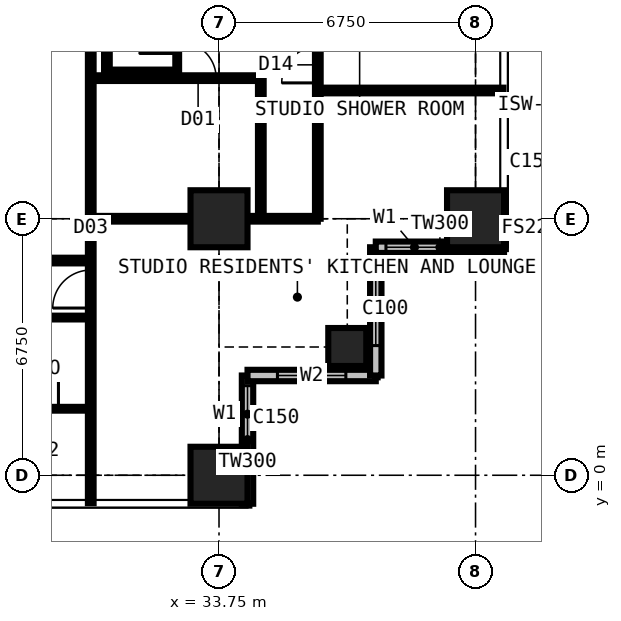
"""IFC4 building model, lengths in metres.
Left out: names, types, materials, properties, quantities, classifications, styles, units other than length and angle.
Written with IfcOpenShell. Run it as: python <this file> out.ifc"""

import sys

from ifc_helpers import new_model, si_unit, direction, frame, frame_2d, origin, origin_2d, place, context, subcontext, project, spatial, rectangle, extrude, element, fill, save


model = new_model("IFC4")
c1 = context("Model", 3, precision=1e-05, world=origin(), true_north=direction((0.0, 1.0)))
c2 = subcontext(c1, "Body", "Model", "MODEL_VIEW")
j1 = project(units=[si_unit("LENGTHUNIT", "METRE"), si_unit("PLANEANGLEUNIT", "RADIAN")], contexts=[c1])
p1 = place(None, origin())
s1 = spatial("IfcSite", under=j1, at=p1, CompositionType="ELEMENT")
p2 = place(p1, origin())
s2 = spatial("IfcBuilding", under=s1, at=p2, CompositionType="ELEMENT")
p3 = place(p2, frame((0.0, 0.0, 116.1)))
s3 = spatial("IfcBuildingStorey", under=s2, at=p3, CompositionType="ELEMENT", Elevation=116.1)
for number, where, z_axis, x_axis in (
    (1, (33.75, 0.0, 0.0), (0.0, 0.0, 1.0), (1.0, 0.0, 0.0)),
    (2, (33.75, 6.75, 0.0), (0.0, 0.0, 1.0), (1.0, 0.0, 0.0)),
):
    element("IfcColumn", number, at=place(p3, frame(where, z_axis=z_axis, x_axis=x_axis)), inside=s3, PredefinedType="COLUMN", context=c2, shape_type="SweptSolid", body=[
        extrude(rectangle(XDim=1.5, YDim=1.5, at=origin_2d()), origin(), (0.0, 0.0, 1.0), 3.6),
    ])
p4 = place(p3, frame((37.125, 3.375, 0.0), z_axis=(0.0, 0.0, 1.0), x_axis=(1.0, 0.0, 0.0)))
e3 = element("IfcColumn", 3, at=p4, inside=s3, PredefinedType="COLUMN", context=c2, shape_type="SweptSolid", body=[
    extrude(rectangle(XDim=1.0, YDim=1.0, at=origin_2d()), origin(), (0.0, 0.0, 1.0), 3.6),
])
p5 = place(p3, frame((40.5, 6.75, 0.0), z_axis=(0.0, 0.0, 1.0), x_axis=(1.0, 0.0, 0.0)))
e4 = element("IfcColumn", 4, at=p5, inside=s3, PredefinedType="COLUMN", context=c2, shape_type="SweptSolid", body=[
    extrude(rectangle(XDim=1.5, YDim=1.5, at=origin_2d()), origin(), (0.0, 0.0, 1.0), 3.6),
])
p6 = place(p3, frame((34.5, -0.75, 0.0), z_axis=(0.0, 0.0, 1.0), x_axis=(0.0, 1.0, 0.0)))
e5 = element("IfcWall", 5, at=p6, inside=s3, PredefinedType="SOLIDWALL", context=c2, shape_type="SweptSolid", body=[
    extrude(rectangle(XDim=3.375, YDim=0.3, at=frame_2d((1.688, 0.0))), origin(), (0.0, 0.0, 1.0), 3.375),
])
p7 = place(p6, frame((1.607, 0.0, 0.9)))
e6 = element("IfcOpeningElement", 6, at=p7, cuts=e5, PredefinedType="OPENING", context=c2, shape_type="SweptSolid", body=[
    extrude(rectangle(XDim=1.5, YDim=1.8, at=frame_2d((0.75, 0.9))), frame((0.0, 0.16, 0.0), z_axis=(0.0, -1.0, 0.0), x_axis=(1.0, 0.0, 0.0)), (0.0, 0.0, 1.0), 0.32),
])
p8 = place(p3, frame((34.5, 2.625, 0.0), z_axis=(0.0, 0.0, 1.0), x_axis=(1.0, 0.0, 0.0)))
e7 = element("IfcWall", 7, at=p8, inside=s3, PredefinedType="SOLIDWALL", context=c2, shape_type="SweptSolid", body=[
    extrude(rectangle(XDim=3.375, YDim=0.3, at=frame_2d((1.688, 0.0))), origin(), (0.0, 0.0, 1.0), 3.375),
])
p9 = place(p8, frame((0.788, 0.0, 0.6)))
e8 = element("IfcOpeningElement", 8, at=p9, cuts=e7, PredefinedType="OPENING", context=c2, shape_type="SweptSolid", body=[
    extrude(rectangle(XDim=1.8, YDim=2.1, at=frame_2d((0.9, 1.05))), frame((0.0, 0.16, 0.0), z_axis=(0.0, -1.0, 0.0), x_axis=(1.0, 0.0, 0.0)), (0.0, 0.0, 1.0), 0.32),
])
p10 = place(p3, frame((37.875, 2.625, 0.0), z_axis=(0.0, 0.0, 1.0), x_axis=(0.0, 1.0, 0.0)))
e9 = element("IfcWall", 9, at=p10, inside=s3, PredefinedType="SOLIDWALL", context=c2, shape_type="SweptSolid", body=[
    extrude(rectangle(XDim=3.375, YDim=0.3, at=frame_2d((1.688, 0.0))), origin(), (0.0, 0.0, 1.0), 3.375),
])
p11 = place(p10, frame((0.788, 0.0, 0.6)))
e10 = element("IfcOpeningElement", 10, at=p11, cuts=e9, PredefinedType="OPENING", context=c2, shape_type="SweptSolid", body=[
    extrude(rectangle(XDim=1.8, YDim=2.1, at=frame_2d((0.9, 1.05))), frame((0.0, 0.16, 0.0), z_axis=(0.0, -1.0, 0.0), x_axis=(1.0, 0.0, 0.0)), (0.0, 0.0, 1.0), 0.32),
])
p12 = place(p3, frame((37.875, 6.0, 0.0), z_axis=(0.0, 0.0, 1.0), x_axis=(1.0, 0.0, 0.0)))
e11 = element("IfcWall", 11, at=p12, inside=s3, PredefinedType="SOLIDWALL", context=c2, shape_type="SweptSolid", body=[
    extrude(rectangle(XDim=3.375, YDim=0.3, at=frame_2d((1.688, 0.0))), origin(), (0.0, 0.0, 1.0), 3.375),
])
p13 = place(p12, frame((0.268, 0.0, 0.9)))
e12 = element("IfcOpeningElement", 12, at=p13, cuts=e11, PredefinedType="OPENING", context=c2, shape_type="SweptSolid", body=[
    extrude(rectangle(XDim=1.5, YDim=1.8, at=frame_2d((0.75, 0.9))), frame((0.0, 0.16, 0.0), z_axis=(0.0, -1.0, 0.0), x_axis=(1.0, 0.0, 0.0)), (0.0, 0.0, 1.0), 0.32),
])
p14 = place(p3, frame((6.75, 4.15, 0.0), z_axis=(0.0, 0.0, 1.0), x_axis=(1.0, 0.0, 0.0)))
e13 = element("IfcWall", 13, at=p14, inside=s3, PredefinedType="PARTITIONING", context=c2, shape_type="SweptSolid", body=[
    extrude(rectangle(XDim=23.625, YDim=0.1, at=frame_2d((11.812, 0.0))), origin(), (0.0, 0.0, 1.0), 3.375),
])
p15 = place(p14, frame((0.2, 0.0, 0.0)))
e14 = element("IfcOpeningElement", 14, at=p15, cuts=e13, PredefinedType="OPENING", context=c2, shape_type="SweptSolid", body=[
    extrude(rectangle(XDim=0.95, YDim=2.2, at=frame_2d((0.475, 1.1))), frame((0.0, 0.06, 0.0), z_axis=(0.0, -1.0, 0.0), x_axis=(1.0, 0.0, 0.0)), (0.0, 0.0, 1.0), 0.12),
])
p16 = place(p14, frame((3.625, 0.0, 0.0)))
e15 = element("IfcOpeningElement", 15, at=p16, cuts=e13, PredefinedType="OPENING", context=c2, shape_type="SweptSolid", body=[
    extrude(rectangle(XDim=0.95, YDim=2.2, at=frame_2d((0.475, 1.1))), frame((0.0, 0.06, 0.0), z_axis=(0.0, -1.0, 0.0), x_axis=(1.0, 0.0, 0.0)), (0.0, 0.0, 1.0), 0.12),
])
p17 = place(p14, frame((7.0, 0.0, 0.0)))
e16 = element("IfcOpeningElement", 16, at=p17, cuts=e13, PredefinedType="OPENING", context=c2, shape_type="SweptSolid", body=[
    extrude(rectangle(XDim=0.95, YDim=2.2, at=frame_2d((0.475, 1.1))), frame((0.0, 0.06, 0.0), z_axis=(0.0, -1.0, 0.0), x_axis=(1.0, 0.0, 0.0)), (0.0, 0.0, 1.0), 0.12),
])
p18 = place(p14, frame((10.375, 0.0, 0.0)))
e17 = element("IfcOpeningElement", 17, at=p18, cuts=e13, PredefinedType="OPENING", context=c2, shape_type="SweptSolid", body=[
    extrude(rectangle(XDim=0.95, YDim=2.2, at=frame_2d((0.475, 1.1))), frame((0.0, 0.06, 0.0), z_axis=(0.0, -1.0, 0.0), x_axis=(1.0, 0.0, 0.0)), (0.0, 0.0, 1.0), 0.12),
])
p19 = place(p14, frame((18.475, 0.0, 0.0)))
e18 = element("IfcOpeningElement", 18, at=p19, cuts=e13, PredefinedType="OPENING", context=c2, shape_type="SweptSolid", body=[
    extrude(rectangle(XDim=0.95, YDim=2.2, at=frame_2d((0.475, 1.1))), frame((0.0, 0.06, 0.0), z_axis=(0.0, -1.0, 0.0), x_axis=(1.0, 0.0, 0.0)), (0.0, 0.0, 1.0), 0.12),
])
p20 = place(p14, frame((13.7, 0.0, 0.0)))
e19 = element("IfcOpeningElement", 19, at=p20, cuts=e13, PredefinedType="OPENING", context=c2, shape_type="SweptSolid", body=[
    extrude(rectangle(XDim=0.95, YDim=2.2, at=frame_2d((0.475, 1.1))), frame((0.0, 0.06, 0.0), z_axis=(0.0, -1.0, 0.0), x_axis=(1.0, 0.0, 0.0)), (0.0, 0.0, 1.0), 0.12),
])
p21 = place(p3, frame((22.988, 5.65, 0.0), z_axis=(0.0, 0.0, 1.0), x_axis=(1.0, 0.0, 0.0)))
e20 = element("IfcWall", 20, at=p21, inside=s3, PredefinedType="PARTITIONING", context=c2, shape_type="SweptSolid", body=[
    extrude(rectangle(XDim=7.387, YDim=0.15, at=frame_2d((3.694, 0.0))), origin(), (0.0, 0.0, 1.0), 3.375),
])
p22 = place(p21, frame((2.3, 0.0, 0.0)))
e21 = element("IfcOpeningElement", 21, at=p22, cuts=e20, PredefinedType="OPENING", context=c2, shape_type="SweptSolid", body=[
    extrude(rectangle(XDim=0.95, YDim=2.2, at=frame_2d((0.475, 1.1))), frame((0.0, 0.085, 0.0), z_axis=(0.0, -1.0, 0.0), x_axis=(1.0, 0.0, 0.0)), (0.0, 0.0, 1.0), 0.17),
])
p23 = place(p3, frame((27.775, 1.75, 0.0), z_axis=(0.0, 0.0, 1.0), x_axis=(1.0, 0.0, 0.0)))
e22 = element("IfcWall", 22, at=p23, inside=s3, PredefinedType="PARTITIONING", context=c2, shape_type="SweptSolid", body=[
    extrude(rectangle(XDim=2.6, YDim=0.1, at=frame_2d((1.3, 0.0))), origin(), (0.0, 0.0, 1.0), 3.375),
])
p24 = place(p23, frame((0.85, 0.0, 0.0)))
e23 = element("IfcOpeningElement", 23, at=p24, cuts=e22, PredefinedType="OPENING", context=c2, shape_type="SweptSolid", body=[
    extrude(rectangle(XDim=0.9, YDim=2.2, at=frame_2d((0.45, 1.1))), frame((0.0, 0.06, 0.0), z_axis=(0.0, -1.0, 0.0), x_axis=(1.0, 0.0, 0.0)), (0.0, 0.0, 1.0), 0.12),
])
p25 = place(p3, frame((30.375, -0.734, 0.0), z_axis=(0.0, 0.0, 1.0), x_axis=(0.0, 1.0, 0.0)))
e24 = element("IfcWall", 24, at=p25, inside=s3, PredefinedType="PARTITIONING", context=c2, shape_type="SweptSolid", body=[
    extrude(rectangle(XDim=12.034, YDim=0.15, at=frame_2d((6.017, 0.0))), origin(), (0.0, 0.0, 1.0), 3.375),
])
p26 = place(p25, frame((5.134, 0.0, 0.0)))
e25 = element("IfcOpeningElement", 25, at=p26, cuts=e24, PredefinedType="OPENING", context=c2, shape_type="SweptSolid", body=[
    extrude(rectangle(XDim=1.0, YDim=2.2, at=frame_2d((0.5, 1.1))), frame((0.0, 0.085, 0.0), z_axis=(0.0, -1.0, 0.0), x_axis=(1.0, 0.0, 0.0)), (0.0, 0.0, 1.0), 0.17),
])
p27 = place(p3, frame((30.375, 6.75, 0.0), z_axis=(0.0, 0.0, 1.0), x_axis=(1.0, 0.0, 0.0)))
e26 = element("IfcWall", 26, at=p27, inside=s3, PredefinedType="PARTITIONING", context=c2, shape_type="SweptSolid", body=[
    extrude(rectangle(XDim=5.975, YDim=0.15, at=frame_2d((2.988, 0.0))), origin(), (0.0, 0.0, 1.0), 2.877),
])
p28 = place(p3, frame((30.375, 10.45, 0.0), z_axis=(0.0, 0.0, 1.0), x_axis=(1.0, 0.0, 0.0)))
e27 = element("IfcWall", 27, at=p28, inside=s3, PredefinedType="PARTITIONING", context=c2, shape_type="SweptSolid", body=[
    extrude(rectangle(XDim=4.475, YDim=0.15, at=frame_2d((2.238, 0.0))), origin(), (0.0, 0.0, 1.0), 3.375),
])
p29 = place(p28, frame((2.35, 0.0, 0.0)))
e28 = element("IfcOpeningElement", 28, at=p29, cuts=e27, PredefinedType="OPENING", context=c2, shape_type="SweptSolid", body=[
    extrude(rectangle(XDim=0.95, YDim=2.2, at=frame_2d((0.475, 1.1))), frame((0.0, 0.085, 0.0), z_axis=(0.0, -1.0, 0.0), x_axis=(1.0, 0.0, 0.0)), (0.0, 0.0, 1.0), 0.17),
])
p30 = place(p3, frame((30.8, 10.6, 0.0), z_axis=(0.0, 0.0, 1.0), x_axis=(0.0, 1.0, 0.0)))
e29 = element("IfcWall", 29, at=p30, inside=s3, PredefinedType="PARTITIONING", context=c2, shape_type="SweptSolid", body=[
    extrude(rectangle(XDim=0.7, YDim=0.15, at=frame_2d((0.35, 0.0))), origin(), (0.0, 0.0, 1.0), 3.375),
])
p31 = place(p3, frame((30.8, 10.6, 0.0), z_axis=(0.0, 0.0, 1.0), x_axis=(1.0, 0.0, 0.0)))
e30 = element("IfcWall", 30, at=p31, inside=s3, PredefinedType="PARTITIONING", context=c2, shape_type="SweptSolid", body=[
    extrude(rectangle(XDim=1.85, YDim=0.15, at=frame_2d((0.925, 0.0))), origin(), (0.0, 0.0, 1.0), 3.375),
])
p32 = place(p3, frame((32.65, 10.6, 0.0), z_axis=(0.0, 0.0, 1.0), x_axis=(0.0, 1.0, 0.0)))
e31 = element("IfcWall", 31, at=p32, inside=s3, PredefinedType="SHEAR", context=c2, shape_type="SweptSolid", body=[
    extrude(rectangle(XDim=9.3, YDim=0.1, at=frame_2d((4.65, 0.0))), origin(), (0.0, 0.0, 1.0), 3.375),
])
p33 = place(p32, frame((0.5, 0.0, 0.0)))
e32 = element("IfcOpeningElement", 32, at=p33, cuts=e31, PredefinedType="OPENING", context=c2, shape_type="SweptSolid", body=[
    extrude(rectangle(XDim=1.0, YDim=2.2, at=frame_2d((0.5, 1.1))), frame((0.0, 0.06, 0.0), z_axis=(0.0, -1.0, 0.0), x_axis=(1.0, 0.0, 0.0)), (0.0, 0.0, 1.0), 0.12),
])
p34 = place(p3, frame((34.85, 6.75, 0.0), z_axis=(0.0, 0.0, 1.0), x_axis=(0.0, 1.0, 0.0)))
e33 = element("IfcWall", 33, at=p34, inside=s3, PredefinedType="PARTITIONING", context=c2, shape_type="SweptSolid", body=[
    extrude(rectangle(XDim=3.7, YDim=0.15, at=frame_2d((1.85, 0.0))), origin(), (0.0, 0.0, 1.0), 3.375),
])
p35 = place(p3, frame((36.35, 6.75, 0.0), z_axis=(0.0, 0.0, 1.0), x_axis=(0.0, 1.0, 0.0)))
e34 = element("IfcWall", 34, at=p35, inside=s3, PredefinedType="PARTITIONING", context=c2, shape_type="SweptSolid", body=[
    extrude(rectangle(XDim=20.25, YDim=0.15, at=frame_2d((10.125, 0.0))), origin(), (0.0, 0.0, 1.0), 3.375),
])
p36 = place(p35, frame((15.1, 0.0, 0.0)))
e35 = element("IfcOpeningElement", 35, at=p36, cuts=e34, PredefinedType="OPENING", context=c2, shape_type="SweptSolid", body=[
    extrude(rectangle(XDim=0.95, YDim=2.2, at=frame_2d((0.475, 1.1))), frame((0.0, 0.085, 0.0), z_axis=(0.0, -1.0, 0.0), x_axis=(1.0, 0.0, 0.0)), (0.0, 0.0, 1.0), 0.17),
])
p37 = place(p35, frame((8.35, 0.0, 0.0)))
e36 = element("IfcOpeningElement", 36, at=p37, cuts=e34, PredefinedType="OPENING", context=c2, shape_type="SweptSolid", body=[
    extrude(rectangle(XDim=0.95, YDim=2.2, at=frame_2d((0.475, 1.1))), frame((0.0, 0.085, 0.0), z_axis=(0.0, -1.0, 0.0), x_axis=(1.0, 0.0, 0.0)), (0.0, 0.0, 1.0), 0.17),
])
p38 = place(p35, frame((3.575, 0.0, 0.0)))
e37 = element("IfcOpeningElement", 37, at=p38, cuts=e34, PredefinedType="OPENING", context=c2, shape_type="SweptSolid", body=[
    extrude(rectangle(XDim=0.95, YDim=2.2, at=frame_2d((0.475, 1.1))), frame((0.0, 0.085, 0.0), z_axis=(0.0, -1.0, 0.0), x_axis=(1.0, 0.0, 0.0)), (0.0, 0.0, 1.0), 0.17),
])
p39 = place(p3, frame((36.35, 10.125, 0.0), z_axis=(0.0, 0.0, 1.0), x_axis=(1.0, 0.0, 0.0)))
e38 = element("IfcWall", 38, at=p39, inside=s3, PredefinedType="PARTITIONING", context=c2, shape_type="SweptSolid", body=[
    extrude(rectangle(XDim=4.884, YDim=0.15, at=frame_2d((2.442, 0.0))), origin(), (0.0, 0.0, 1.0), 3.375),
])
p40 = place(p7, origin())
e39 = element("IfcWindow", 39, at=p40, inside=s3, PartitioningType="SINGLE_PANEL", PredefinedType="WINDOW", context=c2, shape_type="SweptSolid", body=[
    extrude(rectangle(XDim=1.5, YDim=1.8, at=frame_2d((0.75, 0.9))), frame((0.0, 0.03, 0.0), z_axis=(0.0, -1.0, 0.0), x_axis=(1.0, 0.0, 0.0)), (0.0, 0.0, 1.0), 0.06),
])
fill(e6, e39)
p41 = place(p9, origin())
e40 = element("IfcWindow", 40, at=p41, inside=s3, PartitioningType="SINGLE_PANEL", PredefinedType="WINDOW", context=c2, shape_type="SweptSolid", body=[
    extrude(rectangle(XDim=1.8, YDim=2.1, at=frame_2d((0.9, 1.05))), frame((0.0, 0.03, 0.0), z_axis=(0.0, -1.0, 0.0), x_axis=(1.0, 0.0, 0.0)), (0.0, 0.0, 1.0), 0.06),
])
fill(e8, e40)
p42 = place(p11, origin())
e41 = element("IfcWindow", 41, at=p42, inside=s3, PartitioningType="SINGLE_PANEL", PredefinedType="WINDOW", context=c2, shape_type="SweptSolid", body=[
    extrude(rectangle(XDim=1.8, YDim=2.1, at=frame_2d((0.9, 1.05))), frame((0.0, 0.03, 0.0), z_axis=(0.0, -1.0, 0.0), x_axis=(1.0, 0.0, 0.0)), (0.0, 0.0, 1.0), 0.06),
])
fill(e10, e41)
p43 = place(p13, origin())
e42 = element("IfcWindow", 42, at=p43, inside=s3, PartitioningType="SINGLE_PANEL", PredefinedType="WINDOW", context=c2, shape_type="SweptSolid", body=[
    extrude(rectangle(XDim=1.5, YDim=1.8, at=frame_2d((0.75, 0.9))), frame((0.0, 0.03, 0.0), z_axis=(0.0, -1.0, 0.0), x_axis=(1.0, 0.0, 0.0)), (0.0, 0.0, 1.0), 0.06),
])
fill(e12, e42)
p44 = place(p24, origin())
e43 = element("IfcDoor", 43, at=p44, inside=s3, OperationType="SINGLE_SWING_RIGHT", PredefinedType="DOOR", context=c2, shape_type="SweptSolid", body=[
    extrude(rectangle(XDim=0.9, YDim=2.2, at=frame_2d((0.45, 1.1))), frame((0.0, 0.025, 0.0), z_axis=(0.0, -1.0, 0.0), x_axis=(1.0, 0.0, 0.0)), (0.0, 0.0, 1.0), 0.05),
])
fill(e23, e43)
p45 = place(p26, origin())
e44 = element("IfcDoor", 44, at=p45, inside=s3, OperationType="SINGLE_SWING_LEFT", PredefinedType="DOOR", context=c2, shape_type="SweptSolid", body=[
    extrude(rectangle(XDim=1.0, YDim=2.2, at=frame_2d((0.5, 1.1))), frame((0.0, 0.025, 0.0), z_axis=(0.0, -1.0, 0.0), x_axis=(1.0, 0.0, 0.0)), (0.0, 0.0, 1.0), 0.05),
])
fill(e25, e44)
p46 = place(p38, origin())
e45 = element("IfcDoor", 45, at=p46, inside=s3, OperationType="SINGLE_SWING_LEFT", PredefinedType="DOOR", context=c2, shape_type="SweptSolid", body=[
    extrude(rectangle(XDim=0.95, YDim=2.2, at=frame_2d((0.475, 1.1))), frame((0.0, 0.025, 0.0), z_axis=(0.0, -1.0, 0.0), x_axis=(1.0, 0.0, 0.0)), (0.0, 0.0, 1.0), 0.05),
])
fill(e37, e45)
p47 = place(p33, origin())
e46 = element("IfcDoor", 46, at=p47, inside=s3, OperationType="SINGLE_SWING_LEFT", PredefinedType="DOOR", context=c2, shape_type="SweptSolid", body=[
    extrude(rectangle(XDim=1.0, YDim=2.2, at=frame_2d((0.5, 1.1))), frame((0.0, 0.025, 0.0), z_axis=(0.0, -1.0, 0.0), x_axis=(1.0, 0.0, 0.0)), (0.0, 0.0, 1.0), 0.05),
])
fill(e32, e46)
p48 = place(p29, origin())
e47 = element("IfcDoor", 47, at=p48, inside=s3, OperationType="SINGLE_SWING_LEFT", PredefinedType="DOOR", context=c2, shape_type="SweptSolid", body=[
    extrude(rectangle(XDim=0.95, YDim=2.2, at=frame_2d((0.475, 1.1))), frame((0.0, 0.025, 0.0), z_axis=(0.0, -1.0, 0.0), x_axis=(1.0, 0.0, 0.0)), (0.0, 0.0, 1.0), 0.05),
])
fill(e28, e47)
save(model, sys.argv[1])
